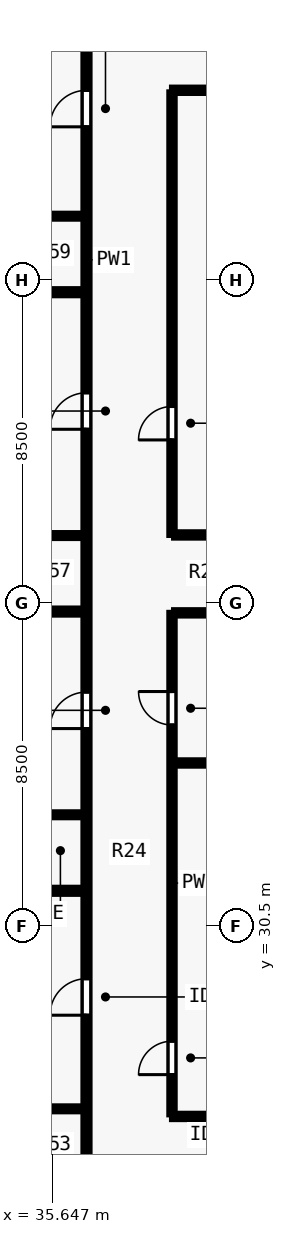
"""IFC4 building model, lengths in metres.
Left out: names, types, materials, properties, quantities, classifications, styles, units other than length and angle.
Written with IfcOpenShell. Run it as: python <this file> out.ifc"""

import sys

from ifc_helpers import new_model, si_unit, direction, frame, frame_2d, origin, place, context, subcontext, project, spatial, rectangle, extrude, element, fill, save


model = new_model("IFC4")
c1 = context("Model", 3, precision=1e-05, world=origin(), true_north=direction((0.0, 1.0)))
c2 = subcontext(c1, "Body", "Model", "MODEL_VIEW")
j1 = project(units=[si_unit("LENGTHUNIT", "METRE"), si_unit("PLANEANGLEUNIT", "RADIAN")], contexts=[c1])
p1 = place(None, origin())
s1 = spatial("IfcSite", under=j1, at=p1, CompositionType="ELEMENT")
p2 = place(p1, origin())
s2 = spatial("IfcBuilding", under=s1, at=p2, CompositionType="ELEMENT")
p3 = place(p2, frame((0.0, 0.0, 83.0)))
s3 = spatial("IfcBuildingStorey", under=s2, at=p3, CompositionType="ELEMENT", Elevation=83.0)
p4 = place(p3, frame((36.55, 23.315, 0.0), z_axis=(0.0, 0.0, 1.0), x_axis=(0.0, 1.0, 0.0)))
e1 = element("IfcWall", 1, at=p4, inside=s3, PredefinedType="PARTITIONING", context=c2, shape_type="SweptSolid", body=[
    extrude(rectangle(XDim=31.37, YDim=0.16, at=frame_2d((15.685, 0.0))), origin(), (0.0, 0.0, 1.0), 3.28),
])
p5 = place(p4, frame((4.848, 0.0, 0.0)))
e2 = element("IfcOpeningElement", 2, at=p5, cuts=e1, PredefinedType="OPENING", context=c2, shape_type="SweptSolid", body=[
    extrude(rectangle(XDim=0.96, YDim=2.15, at=frame_2d((0.48, 1.075))), frame((0.0, 0.09, 0.0), z_axis=(0.0, -1.0, 0.0), x_axis=(1.0, 0.0, 0.0)), (0.0, 0.0, 1.0), 0.18),
])
p6 = place(p4, frame((12.39, 0.0, 0.0)))
e3 = element("IfcOpeningElement", 3, at=p6, cuts=e1, PredefinedType="OPENING", context=c2, shape_type="SweptSolid", body=[
    extrude(rectangle(XDim=0.96, YDim=2.15, at=frame_2d((0.48, 1.075))), frame((0.0, 0.09, 0.0), z_axis=(0.0, -1.0, 0.0), x_axis=(1.0, 0.0, 0.0)), (0.0, 0.0, 1.0), 0.18),
])
p7 = place(p4, frame((20.265, 0.0, 0.0)))
e4 = element("IfcOpeningElement", 4, at=p7, cuts=e1, PredefinedType="OPENING", context=c2, shape_type="SweptSolid", body=[
    extrude(rectangle(XDim=0.96, YDim=2.15, at=frame_2d((0.48, 1.075))), frame((0.0, 0.09, 0.0), z_axis=(0.0, -1.0, 0.0), x_axis=(1.0, 0.0, 0.0)), (0.0, 0.0, 1.0), 0.18),
])
p8 = place(p4, frame((28.223, 0.0, 0.0)))
e5 = element("IfcOpeningElement", 5, at=p8, cuts=e1, PredefinedType="OPENING", context=c2, shape_type="SweptSolid", body=[
    extrude(rectangle(XDim=0.96, YDim=2.15, at=frame_2d((0.48, 1.075))), frame((0.0, 0.09, 0.0), z_axis=(0.0, -1.0, 0.0), x_axis=(1.0, 0.0, 0.0)), (0.0, 0.0, 1.0), 0.18),
])
p9 = place(p3, frame((38.8, 25.5, 0.0), z_axis=(0.0, 0.0, 1.0), x_axis=(1.0, 0.0, 0.0)))
e6 = element("IfcWall", 6, at=p9, inside=s3, PredefinedType="PARTITIONING", context=c2, shape_type="SweptSolid", body=[
    extrude(rectangle(XDim=26.4, YDim=0.14, at=frame_2d((13.2, 0.0))), origin(), (0.0, 0.0, 1.0), 3.28),
])
p10 = place(p9, frame((2.2, 0.0, 0.0)))
e7 = element("IfcOpeningElement", 7, at=p10, cuts=e6, PredefinedType="OPENING", context=c2, shape_type="SweptSolid", body=[
    extrude(rectangle(XDim=0.96, YDim=2.12, at=frame_2d((0.48, 1.06))), frame((0.0, 0.08, 0.0), z_axis=(0.0, -1.0, 0.0), x_axis=(1.0, 0.0, 0.0)), (0.0, 0.0, 1.0), 0.16),
])
p11 = place(p9, frame((15.2, 0.0, 0.0)))
e8 = element("IfcOpeningElement", 8, at=p11, cuts=e6, PredefinedType="OPENING", context=c2, shape_type="SweptSolid", body=[
    extrude(rectangle(XDim=0.96, YDim=2.12, at=frame_2d((0.48, 1.06))), frame((0.0, 0.08, 0.0), z_axis=(0.0, -1.0, 0.0), x_axis=(1.0, 0.0, 0.0)), (0.0, 0.0, 1.0), 0.16),
])
p12 = place(p3, frame((38.8, 52.5, 0.0), z_axis=(0.0, 0.0, 1.0), x_axis=(1.0, 0.0, 0.0)))
e9 = element("IfcWall", 9, at=p12, inside=s3, PredefinedType="PARTITIONING", context=c2, shape_type="SweptSolid", body=[
    extrude(rectangle(XDim=26.4, YDim=0.14, at=frame_2d((13.2, 0.0))), origin(), (0.0, 0.0, 1.0), 3.28),
])
p13 = place(p12, frame((3.2, 0.0, 0.0)))
e10 = element("IfcOpeningElement", 10, at=p13, cuts=e9, PredefinedType="OPENING", context=c2, shape_type="SweptSolid", body=[
    extrude(rectangle(XDim=0.96, YDim=2.12, at=frame_2d((0.48, 1.06))), frame((0.0, 0.08, 0.0), z_axis=(0.0, -1.0, 0.0), x_axis=(1.0, 0.0, 0.0)), (0.0, 0.0, 1.0), 0.16),
])
p14 = place(p12, frame((19.2, 0.0, 0.0)))
e11 = element("IfcOpeningElement", 11, at=p14, cuts=e9, PredefinedType="OPENING", context=c2, shape_type="SweptSolid", body=[
    extrude(rectangle(XDim=0.96, YDim=2.12, at=frame_2d((0.48, 1.06))), frame((0.0, 0.08, 0.0), z_axis=(0.0, -1.0, 0.0), x_axis=(1.0, 0.0, 0.0)), (0.0, 0.0, 1.0), 0.16),
])
p15 = place(p3, frame((38.8, 25.555, 0.0), z_axis=(0.0, 0.0, 1.0), x_axis=(0.0, 1.0, 0.0)))
e12 = element("IfcWall", 12, at=p15, inside=s3, PredefinedType="PARTITIONING", context=c2, shape_type="SweptSolid", body=[
    extrude(rectangle(XDim=13.195, YDim=0.14, at=frame_2d((6.598, 0.0))), origin(), (0.0, 0.0, 1.0), 3.28),
])
p16 = place(p15, frame((1.045, 0.0, 0.0)))
e13 = element("IfcOpeningElement", 13, at=p16, cuts=e12, PredefinedType="OPENING", context=c2, shape_type="SweptSolid", body=[
    extrude(rectangle(XDim=0.88, YDim=2.1, at=frame_2d((0.44, 1.05))), frame((0.0, 0.08, 0.0), z_axis=(0.0, -1.0, 0.0), x_axis=(1.0, 0.0, 0.0)), (0.0, 0.0, 1.0), 0.16),
])
p17 = place(p15, frame((10.245, 0.0, 0.0)))
e14 = element("IfcOpeningElement", 14, at=p17, cuts=e12, PredefinedType="OPENING", context=c2, shape_type="SweptSolid", body=[
    extrude(rectangle(XDim=0.88, YDim=2.1, at=frame_2d((0.44, 1.05))), frame((0.0, 0.08, 0.0), z_axis=(0.0, -1.0, 0.0), x_axis=(1.0, 0.0, 0.0)), (0.0, 0.0, 1.0), 0.16),
])
p18 = place(p3, frame((38.8, 40.8, 0.0), z_axis=(0.0, 0.0, 1.0), x_axis=(0.0, 1.0, 0.0)))
e15 = element("IfcWall", 15, at=p18, inside=s3, PredefinedType="PARTITIONING", context=c2, shape_type="SweptSolid", body=[
    extrude(rectangle(XDim=11.645, YDim=0.14, at=frame_2d((5.823, 0.0))), origin(), (0.0, 0.0, 1.0), 3.28),
])
p19 = place(p18, frame((2.5, 0.0, 0.0)))
e16 = element("IfcOpeningElement", 16, at=p19, cuts=e15, PredefinedType="OPENING", context=c2, shape_type="SweptSolid", body=[
    extrude(rectangle(XDim=0.88, YDim=2.1, at=frame_2d((0.44, 1.05))), frame((0.0, 0.08, 0.0), z_axis=(0.0, -1.0, 0.0), x_axis=(1.0, 0.0, 0.0)), (0.0, 0.0, 1.0), 0.16),
])
for number, where, z_axis, x_axis in (
    (17, (38.855, 38.75, 0.0), (0.0, 0.0, 1.0), (1.0, 0.0, 0.0)),
    (18, (38.855, 40.8, 0.0), (0.0, 0.0, 1.0), (1.0, 0.0, 0.0)),
    (19, (38.855, 34.8, 0.0), (0.0, 0.0, 1.0), (1.0, 0.0, 0.0)),
):
    element("IfcWall", number, at=place(p3, frame(where, z_axis=z_axis, x_axis=x_axis)), inside=s3, PredefinedType="PARTITIONING", context=c2, shape_type="SweptSolid", body=[
        extrude(rectangle(XDim=4.385, YDim=0.14, at=frame_2d((2.192, 0.0))), origin(), (0.0, 0.0, 1.0), 3.28),
    ])
p20 = place(p3, frame((34.25, 25.7, 0.0), z_axis=(0.0, 0.0, 1.0), x_axis=(1.0, 0.0, 0.0)))
e20 = element("IfcWall", 20, at=p20, inside=s3, PredefinedType="PLUMBINGWALL", context=c2, shape_type="SweptSolid", body=[
    extrude(rectangle(XDim=2.235, YDim=0.13, at=frame_2d((1.118, 0.0))), origin(), (0.0, 0.0, 1.0), 3.28),
])
p21 = place(p3, frame((26.845, 31.437, 0.0), z_axis=(0.0, 0.0, 1.0), x_axis=(1.0, 0.0, 0.0)))
e21 = element("IfcWall", 21, at=p21, inside=s3, PredefinedType="PARTITIONING", context=c2, shape_type="SweptSolid", body=[
    extrude(rectangle(XDim=9.64, YDim=0.16, at=frame_2d((4.82, 0.0))), origin(), (0.0, 0.0, 1.0), 3.28),
])
p22 = place(p3, frame((34.25, 33.437, 0.0), z_axis=(0.0, 0.0, 1.0), x_axis=(1.0, 0.0, 0.0)))
e22 = element("IfcWall", 22, at=p22, inside=s3, PredefinedType="PLUMBINGWALL", context=c2, shape_type="SweptSolid", body=[
    extrude(rectangle(XDim=2.235, YDim=0.13, at=frame_2d((1.118, 0.0))), origin(), (0.0, 0.0, 1.0), 3.28),
])
p23 = place(p3, frame((26.845, 38.784, 0.0), z_axis=(0.0, 0.0, 1.0), x_axis=(1.0, 0.0, 0.0)))
e23 = element("IfcWall", 23, at=p23, inside=s3, PredefinedType="PARTITIONING", context=c2, shape_type="SweptSolid", body=[
    extrude(rectangle(XDim=9.64, YDim=0.16, at=frame_2d((4.82, 0.0))), origin(), (0.0, 0.0, 1.0), 2.849),
])
p24 = place(p3, frame((34.25, 40.784, 0.0), z_axis=(0.0, 0.0, 1.0), x_axis=(1.0, 0.0, 0.0)))
e24 = element("IfcWall", 24, at=p24, inside=s3, PredefinedType="PLUMBINGWALL", context=c2, shape_type="SweptSolid", body=[
    extrude(rectangle(XDim=2.235, YDim=0.13, at=frame_2d((1.118, 0.0))), origin(), (0.0, 0.0, 1.0), 2.849),
])
p25 = place(p3, frame((26.845, 47.187, 0.0), z_axis=(0.0, 0.0, 1.0), x_axis=(1.0, 0.0, 0.0)))
e25 = element("IfcWall", 25, at=p25, inside=s3, PredefinedType="PARTITIONING", context=c2, shape_type="SweptSolid", body=[
    extrude(rectangle(XDim=9.64, YDim=0.16, at=frame_2d((4.82, 0.0))), origin(), (0.0, 0.0, 1.0), 3.28),
])
p26 = place(p3, frame((34.25, 49.187, 0.0), z_axis=(0.0, 0.0, 1.0), x_axis=(1.0, 0.0, 0.0)))
e26 = element("IfcWall", 26, at=p26, inside=s3, PredefinedType="PLUMBINGWALL", context=c2, shape_type="SweptSolid", body=[
    extrude(rectangle(XDim=2.235, YDim=0.13, at=frame_2d((1.118, 0.0))), origin(), (0.0, 0.0, 1.0), 3.28),
])
p27 = place(p16, origin())
e27 = element("IfcDoor", 27, at=p27, inside=s3, OperationType="SINGLE_SWING_LEFT", PredefinedType="DOOR", context=c2, shape_type="SweptSolid", body=[
    extrude(rectangle(XDim=0.88, YDim=2.1, at=frame_2d((0.44, 1.05))), frame((0.0, 0.025, 0.0), z_axis=(0.0, -1.0, 0.0), x_axis=(1.0, 0.0, 0.0)), (0.0, 0.0, 1.0), 0.05),
])
fill(e13, e27)
p28 = place(p17, origin())
e28 = element("IfcDoor", 28, at=p28, inside=s3, OperationType="SINGLE_SWING_RIGHT", PredefinedType="DOOR", context=c2, shape_type="SweptSolid", body=[
    extrude(rectangle(XDim=0.88, YDim=2.1, at=frame_2d((0.44, 1.05))), frame((0.0, 0.025, 0.0), z_axis=(0.0, -1.0, 0.0), x_axis=(1.0, 0.0, 0.0)), (0.0, 0.0, 1.0), 0.05),
])
fill(e14, e28)
p29 = place(p19, origin())
e29 = element("IfcDoor", 29, at=p29, inside=s3, OperationType="SINGLE_SWING_LEFT", PredefinedType="DOOR", context=c2, shape_type="SweptSolid", body=[
    extrude(rectangle(XDim=0.88, YDim=2.1, at=frame_2d((0.44, 1.05))), frame((0.0, 0.025, 0.0), z_axis=(0.0, -1.0, 0.0), x_axis=(1.0, 0.0, 0.0)), (0.0, 0.0, 1.0), 0.05),
])
fill(e16, e29)
p30 = place(p5, origin())
e30 = element("IfcDoor", 30, at=p30, inside=s3, OperationType="SINGLE_SWING_LEFT", PredefinedType="DOOR", context=c2, shape_type="SweptSolid", body=[
    extrude(rectangle(XDim=0.96, YDim=2.15, at=frame_2d((0.48, 1.075))), frame((0.0, 0.025, 0.0), z_axis=(0.0, -1.0, 0.0), x_axis=(1.0, 0.0, 0.0)), (0.0, 0.0, 1.0), 0.05),
])
fill(e2, e30)
p31 = place(p6, origin())
e31 = element("IfcDoor", 31, at=p31, inside=s3, OperationType="SINGLE_SWING_LEFT", PredefinedType="DOOR", context=c2, shape_type="SweptSolid", body=[
    extrude(rectangle(XDim=0.96, YDim=2.15, at=frame_2d((0.48, 1.075))), frame((0.0, 0.025, 0.0), z_axis=(0.0, -1.0, 0.0), x_axis=(1.0, 0.0, 0.0)), (0.0, 0.0, 1.0), 0.05),
])
fill(e3, e31)
p32 = place(p7, origin())
e32 = element("IfcDoor", 32, at=p32, inside=s3, OperationType="SINGLE_SWING_LEFT", PredefinedType="DOOR", context=c2, shape_type="SweptSolid", body=[
    extrude(rectangle(XDim=0.96, YDim=2.15, at=frame_2d((0.48, 1.075))), frame((0.0, 0.025, 0.0), z_axis=(0.0, -1.0, 0.0), x_axis=(1.0, 0.0, 0.0)), (0.0, 0.0, 1.0), 0.05),
])
fill(e4, e32)
p33 = place(p8, origin())
e33 = element("IfcDoor", 33, at=p33, inside=s3, OperationType="SINGLE_SWING_LEFT", PredefinedType="DOOR", context=c2, shape_type="SweptSolid", body=[
    extrude(rectangle(XDim=0.96, YDim=2.15, at=frame_2d((0.48, 1.075))), frame((0.0, 0.025, 0.0), z_axis=(0.0, -1.0, 0.0), x_axis=(1.0, 0.0, 0.0)), (0.0, 0.0, 1.0), 0.05),
])
fill(e5, e33)
save(model, sys.argv[1])
